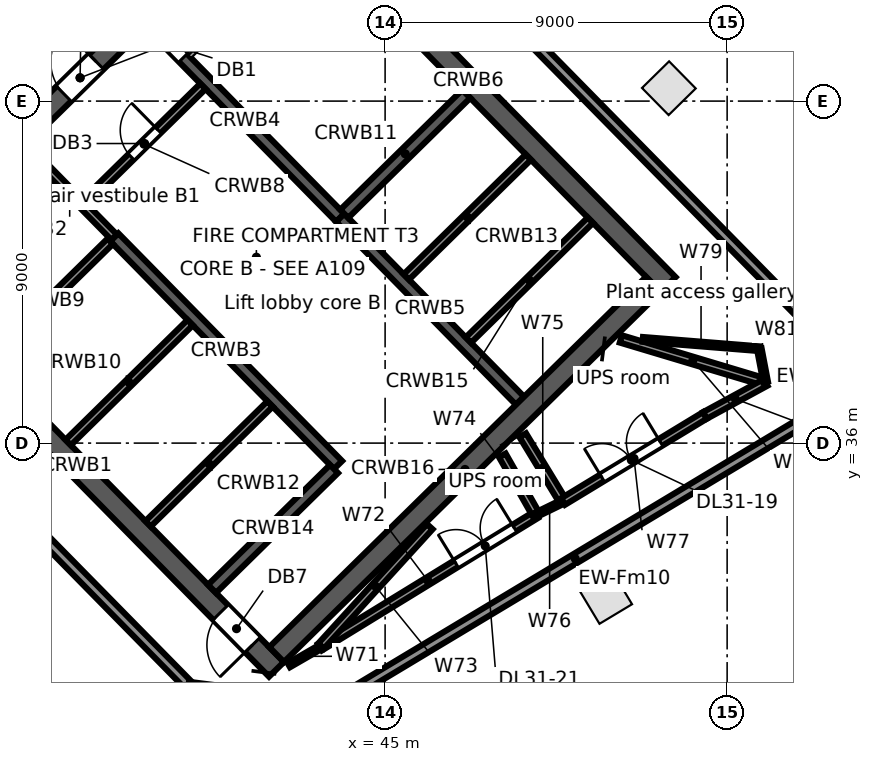
"""IFC4 building model, lengths in metres.
Left out: names, types, materials, properties, quantities, classifications, styles, units other than length and angle.
Written with IfcOpenShell. Run it as: python <this file> out.ifc"""

import sys

from ifc_helpers import new_model, si_unit, direction, frame, frame_2d, origin, origin_2d, place, context, subcontext, project, spatial, rectangle, extrude, element, fill, save


model = new_model("IFC4")
c1 = context("Model", 3, precision=1e-05, world=origin(), true_north=direction((0.0, 1.0)))
c2 = subcontext(c1, "Body", "Model", "MODEL_VIEW")
j1 = project(units=[si_unit("LENGTHUNIT", "METRE"), si_unit("PLANEANGLEUNIT", "RADIAN")], contexts=[c1])
p1 = place(None, origin())
s1 = spatial("IfcSite", under=j1, at=p1, CompositionType="ELEMENT")
p2 = place(p1, origin())
s2 = spatial("IfcBuilding", under=s1, at=p2, CompositionType="ELEMENT")
p3 = place(p2, frame((0.0, 0.0, 149.9)))
s3 = spatial("IfcBuildingStorey", under=s2, at=p3, CompositionType="ELEMENT", Elevation=149.9)
for number, where, z_axis, x_axis in (
    (1, (50.812, 31.931, 0.0), (0.0, 0.0, 1.0), (0.857, 0.515, 0.0)),
    (2, (52.467, 45.339, 0.0), (0.0, 0.0, 1.0), (-0.701, 0.713, 0.0)),
):
    element("IfcColumn", number, at=place(p3, frame(where, z_axis=z_axis, x_axis=x_axis)), inside=s3, PredefinedType="COLUMN", context=c2, shape_type="SweptSolid", body=[
        extrude(rectangle(XDim=1.0, YDim=1.0, at=origin_2d()), origin(), (0.0, 0.0, 1.0), 4.68),
    ])
p4 = place(p3, frame((39.897, 29.558, 0.0), z_axis=(0.0, 0.0, 1.0), x_axis=(-0.700908640523, 0.713251062137, 0.0)))
e3 = element("IfcWall", 3, at=p4, inside=s3, PredefinedType="STANDARD", context=c2, shape_type="SweptSolid", body=[
    extrude(rectangle(XDim=18.712, YDim=0.25, at=frame_2d((9.356, 0.0))), origin(), (0.0, 0.0, 1.0), 4.68),
])
p5 = place(p3, frame((43.643, 29.108, 0.0), z_axis=(0.0, 0.0, 1.0), x_axis=(-0.992006284618, 0.126188475223, 0.0)))
e4 = element("IfcWall", 4, at=p5, inside=s3, PredefinedType="STANDARD", context=c2, shape_type="SweptSolid", body=[
    extrude(rectangle(XDim=3.85, YDim=0.25, at=frame_2d((1.925, 0.0))), origin(), (0.0, 0.0, 1.0), 4.68),
])
p6 = place(p3, frame((56.441, 36.83, 0.0), z_axis=(0.0, 0.0, 1.0), x_axis=(-0.857162979594, -0.515045266374, 0.0)))
e5 = element("IfcWall", 5, at=p6, inside=s3, PredefinedType="STANDARD", context=c2, shape_type="SweptSolid", body=[
    extrude(rectangle(XDim=15.024, YDim=0.25, at=frame_2d((7.512, 0.0))), origin(), (0.0, 0.0, 1.0), 4.68),
])
p7 = place(p3, frame((39.04, 56.592, 0.0), z_axis=(0.0, 0.0, 1.0), x_axis=(0.700912545681, -0.713247224535, 0.0)))
e6 = element("IfcWall", 6, at=p7, inside=s3, PredefinedType="STANDARD", context=c2, shape_type="SweptSolid", body=[
    extrude(rectangle(XDim=25.157, YDim=0.25, at=frame_2d((12.579, 0.0))), origin(), (0.0, 0.0, 1.0), 4.68),
])
p8 = place(p3, frame((31.628, 40.745, 0.0), z_axis=(0.0, 0.0, 1.0), x_axis=(0.700911255944, -0.713248491965, 0.0)))
e7 = element("IfcWall", 7, at=p8, inside=s3, PredefinedType="SOLIDWALL", context=c2, shape_type="SweptSolid", body=[
    extrude(rectangle(XDim=15.0, YDim=0.55, at=frame_2d((7.5, 0.0))), origin(), (0.0, 0.0, 1.0), 4.68),
])
p9 = place(p8, frame((12.9, 0.0, 0.0)))
e8 = element("IfcOpeningElement", 8, at=p9, cuts=e7, PredefinedType="OPENING", context=c2, shape_type="SweptSolid", body=[
    extrude(rectangle(XDim=1.2, YDim=2.1, at=frame_2d((0.6, 1.05))), frame((0.0, 0.285, 0.0), z_axis=(0.0, -1.0, 0.0), x_axis=(1.0, 0.0, 0.0)), (0.0, 0.0, 1.0), 0.57),
])
p10 = place(p3, frame((35.526, 43.805, 0.0), z_axis=(0.0, 0.0, 1.0), x_axis=(0.700884863746, -0.713274426691, 0.0)))
e9 = element("IfcWall", 9, at=p10, inside=s3, PredefinedType="SOLIDWALL", context=c2, shape_type="SweptSolid", body=[
    extrude(rectangle(XDim=3.35, YDim=0.2, at=frame_2d((1.675, 0.0))), origin(), (0.0, 0.0, 1.0), 4.68),
])
p11 = place(p3, frame((37.874, 41.416, 0.0), z_axis=(0.0, 0.0, 1.0), x_axis=(0.700918271237, -0.71324159795, 0.0)))
e10 = element("IfcWall", 10, at=p11, inside=s3, PredefinedType="SOLIDWALL", context=c2, shape_type="SweptSolid", body=[
    extrude(rectangle(XDim=8.4, YDim=0.3, at=frame_2d((4.2, 0.0))), origin(), (0.0, 0.0, 1.0), 4.68),
])
p12 = place(p3, frame((38.807, 47.029, 0.0), z_axis=(0.0, 0.0, 1.0), x_axis=(0.700916852778, -0.713242991898, 0.0)))
e11 = element("IfcWall", 11, at=p12, inside=s3, PredefinedType="SOLIDWALL", context=c2, shape_type="SweptSolid", body=[
    extrude(rectangle(XDim=7.15, YDim=0.3, at=frame_2d((3.575, 0.0))), origin(), (0.0, 0.0, 1.0), 4.68),
])
p13 = place(p12, frame((0.25, 0.0, 0.0)))
e12 = element("IfcOpeningElement", 12, at=p13, cuts=e11, PredefinedType="OPENING", context=c2, shape_type="SweptSolid", body=[
    extrude(rectangle(XDim=1.0, YDim=2.1, at=frame_2d((0.5, 1.05))), frame((0.0, 0.16, 0.0), z_axis=(0.0, -1.0, 0.0), x_axis=(1.0, 0.0, 0.0)), (0.0, 0.0, 1.0), 0.32),
])
p14 = place(p3, frame((43.819, 41.929, 0.0), z_axis=(0.0, 0.0, 1.0), x_axis=(0.700931209592, -0.713228882912, 0.0)))
e13 = element("IfcWall", 13, at=p14, inside=s3, PredefinedType="SOLIDWALL", context=c2, shape_type="SweptSolid", body=[
    extrude(rectangle(XDim=6.75, YDim=0.3, at=frame_2d((3.375, 0.0))), origin(), (0.0, 0.0, 1.0), 4.68),
])
p15 = place(p3, frame((41.934, 50.873, 0.0), z_axis=(0.0, 0.0, 1.0), x_axis=(0.700911255944, -0.713248491965, 0.0)))
e14 = element("IfcWall", 14, at=p15, inside=s3, PredefinedType="SOLIDWALL", context=c2, shape_type="SweptSolid", body=[
    extrude(rectangle(XDim=15.0, YDim=0.55, at=frame_2d((7.5, 0.0))), origin(), (0.0, 0.0, 1.0), 4.68),
])
p16 = place(p3, frame((32.017, 40.742, 0.0), z_axis=(0.0, 0.0, 1.0), x_axis=(0.713253550094, 0.700906108746, 0.0)))
e15 = element("IfcWall", 15, at=p16, inside=s3, PredefinedType="SOLIDWALL", context=c2, shape_type="SweptSolid", body=[
    extrude(rectangle(XDim=13.9, YDim=0.55, at=frame_2d((6.95, 0.0))), origin(), (0.0, 0.0, 1.0), 4.68),
])
p17 = place(p16, frame((6.35, 0.0, 0.0)))
e16 = element("IfcOpeningElement", 16, at=p17, cuts=e15, PredefinedType="OPENING", context=c2, shape_type="SweptSolid", body=[
    extrude(rectangle(XDim=1.2, YDim=2.1, at=frame_2d((0.6, 1.05))), frame((0.0, 0.285, 0.0), z_axis=(0.0, -1.0, 0.0), x_axis=(1.0, 0.0, 0.0)), (0.0, 0.0, 1.0), 0.57),
])
p18 = place(p3, frame((37.104, 42.342, 0.0), z_axis=(0.0, 0.0, 1.0), x_axis=(0.713281298468, 0.700877870428, 0.0)))
e17 = element("IfcWall", 17, at=p18, inside=s3, PredefinedType="PARTITIONING", context=c2, shape_type="SweptSolid", body=[
    extrude(rectangle(XDim=4.35, YDim=0.2, at=frame_2d((2.175, 0.0))), origin(), (0.0, 0.0, 1.0), 4.68),
])
p19 = place(p18, frame((1.7, 0.0, 0.0)))
e18 = element("IfcOpeningElement", 18, at=p19, cuts=e17, PredefinedType="OPENING", context=c2, shape_type="SweptSolid", body=[
    extrude(rectangle(XDim=1.0, YDim=2.1, at=frame_2d((0.5, 1.05))), frame((0.0, 0.11, 0.0), z_axis=(0.0, -1.0, 0.0), x_axis=(1.0, 0.0, 0.0)), (0.0, 0.0, 1.0), 0.22),
])
p20 = place(p3, frame((34.558, 38.156, 0.0), z_axis=(0.0, 0.0, 1.0), x_axis=(0.713237924006, 0.700922009755, 0.0)))
e19 = element("IfcWall", 19, at=p20, inside=s3, PredefinedType="SOLIDWALL", context=c2, shape_type="SweptSolid", body=[
    extrude(rectangle(XDim=4.5, YDim=0.2, at=frame_2d((2.25, 0.0))), origin(), (0.0, 0.0, 1.0), 4.68),
])
p21 = place(p3, frame((36.66, 36.017, 0.0), z_axis=(0.0, 0.0, 1.0), x_axis=(0.713264577552, 0.700894886848, 0.0)))
e20 = element("IfcWall", 20, at=p21, inside=s3, PredefinedType="SOLIDWALL", context=c2, shape_type="SweptSolid", body=[
    extrude(rectangle(XDim=4.5, YDim=0.2, at=frame_2d((2.25, 0.0))), origin(), (0.0, 0.0, 1.0), 4.68),
])
p22 = place(p3, frame((43.926, 42.034, 0.0), z_axis=(0.0, 0.0, 1.0), x_axis=(0.713210801054, 0.700949608217, 0.0)))
e21 = element("IfcWall", 21, at=p22, inside=s3, PredefinedType="SOLIDWALL", context=c2, shape_type="SweptSolid", body=[
    extrude(rectangle(XDim=4.5, YDim=0.3, at=frame_2d((2.25, 0.0))), origin(), (0.0, 0.0, 1.0), 4.68),
])
p23 = place(p3, frame((38.763, 33.877, 0.0), z_axis=(0.0, 0.0, 1.0), x_axis=(0.713237455685, 0.700922486305, 0.0)))
e22 = element("IfcWall", 22, at=p23, inside=s3, PredefinedType="SOLIDWALL", context=c2, shape_type="SweptSolid", body=[
    extrude(rectangle(XDim=4.5, YDim=0.2, at=frame_2d((2.25, 0.0))), origin(), (0.0, 0.0, 1.0), 4.68),
])
p24 = place(p3, frame((45.559, 40.373, 0.0), z_axis=(0.0, 0.0, 1.0), x_axis=(0.713264577552, 0.700894886848, 0.0)))
e23 = element("IfcWall", 23, at=p24, inside=s3, PredefinedType="SOLIDWALL", context=c2, shape_type="SweptSolid", body=[
    extrude(rectangle(XDim=4.5, YDim=0.2, at=frame_2d((2.25, 0.0))), origin(), (0.0, 0.0, 1.0), 4.68),
])
p25 = place(p3, frame((40.445, 32.165, 0.0), z_axis=(0.0, 0.0, 1.0), x_axis=(0.713264577552, 0.700894886848, 0.0)))
e24 = element("IfcWall", 24, at=p25, inside=s3, PredefinedType="SOLIDWALL", context=c2, shape_type="SweptSolid", body=[
    extrude(rectangle(XDim=4.5, YDim=0.3, at=frame_2d((2.25, 0.0))), origin(), (0.0, 0.0, 1.0), 4.68),
])
p26 = place(p3, frame((47.192, 38.711, 0.0), z_axis=(0.0, 0.0, 1.0), x_axis=(0.713264577552, 0.700894886848, 0.0)))
e25 = element("IfcWall", 25, at=p26, inside=s3, PredefinedType="SOLIDWALL", context=c2, shape_type="SweptSolid", body=[
    extrude(rectangle(XDim=4.5, YDim=0.2, at=frame_2d((2.25, 0.0))), origin(), (0.0, 0.0, 1.0), 4.68),
])
p27 = place(p3, frame((42.145, 30.435, 0.0), z_axis=(0.0, 0.0, 1.0), x_axis=(0.713253550094, 0.700906108746, 0.0)))
e26 = element("IfcWall", 26, at=p27, inside=s3, PredefinedType="SOLIDWALL", context=c2, shape_type="SweptSolid", body=[
    extrude(rectangle(XDim=13.9, YDim=0.55, at=frame_2d((6.95, 0.0))), origin(), (0.0, 0.0, 1.0), 4.68),
])
p28 = place(p3, frame((42.466, 30.155, 0.0), z_axis=(0.0, 0.0, 1.0), x_axis=(0.865942754999, 0.50014312458, 0.0)))
e27 = element("IfcWall", 27, at=p28, inside=s3, PredefinedType="PARTITIONING", context=c2, shape_type="SweptSolid", body=[
    extrude(rectangle(XDim=0.938, YDim=0.125, at=frame_2d((0.469, 0.0))), origin(), (0.0, 0.0, 1.0), 4.68),
])
p29 = place(p3, frame((43.286, 30.629, 0.0), z_axis=(0.0, 0.0, 1.0), x_axis=(0.852618082173, 0.522534597852, 0.0)))
e28 = element("IfcWall", 28, at=p29, inside=s3, PredefinedType="PARTITIONING", context=c2, shape_type="SweptSolid", body=[
    extrude(rectangle(XDim=6.671, YDim=0.2, at=frame_2d((3.336, 0.0))), origin(), (0.0, 0.0, 1.0), 4.68),
])
p30 = place(p29, frame((4.2, 0.0, 0.0)))
e29 = element("IfcOpeningElement", 29, at=p30, cuts=e28, PredefinedType="OPENING", context=c2, shape_type="SweptSolid", body=[
    extrude(rectangle(XDim=1.8, YDim=2.1, at=frame_2d((0.9, 1.05))), frame((0.0, 0.11, 0.0), z_axis=(0.0, -1.0, 0.0), x_axis=(1.0, 0.0, 0.0)), (0.0, 0.0, 1.0), 0.22),
])
p31 = place(p3, frame((43.317, 30.663, 0.0), z_axis=(0.0, 0.0, 1.0), x_axis=(0.673505359067, 0.739182339689, 0.0)))
e30 = element("IfcWall", 30, at=p31, inside=s3, PredefinedType="PARTITIONING", context=c2, shape_type="SweptSolid", body=[
    extrude(rectangle(XDim=4.245, YDim=0.2, at=frame_2d((2.123, 0.0))), origin(), (0.0, 0.0, 1.0), 4.68),
])
p32 = place(p3, frame((48.085, 35.677, 0.0), z_axis=(0.0, 0.0, 1.0), x_axis=(0.494821324482, -0.868994739246, 0.0)))
e31 = element("IfcWall", 31, at=p32, inside=s3, PredefinedType="PARTITIONING", context=c2, shape_type="SweptSolid", body=[
    extrude(rectangle(XDim=1.777, YDim=0.2, at=frame_2d((0.888, 0.0))), origin(), (0.0, 0.0, 1.0), 4.68),
])
p33 = place(p3, frame((48.623, 36.206, 0.0), z_axis=(0.0, 0.0, 1.0), x_axis=(0.519728419687, -0.854331533873, 0.0)))
e32 = element("IfcWall", 32, at=p33, inside=s3, PredefinedType="PARTITIONING", context=c2, shape_type="SweptSolid", body=[
    extrude(rectangle(XDim=2.02, YDim=0.2, at=frame_2d((1.01, 0.0))), origin(), (0.0, 0.0, 1.0), 4.68),
])
p34 = place(p3, frame((48.983, 34.12, 0.0), z_axis=(0.0, 0.0, 1.0), x_axis=(0.898634361746, 0.43869839741, 0.0)))
e33 = element("IfcWall", 33, at=p34, inside=s3, PredefinedType="PARTITIONING", context=c2, shape_type="SweptSolid", body=[
    extrude(rectangle(XDim=0.77, YDim=0.125, at=frame_2d((0.385, 0.0))), origin(), (0.0, 0.0, 1.0), 4.411),
])
p35 = place(p3, frame((49.684, 34.463, 0.0), z_axis=(0.0, 0.0, 1.0), x_axis=(0.854856618014, 0.518864300794, 0.0)))
e34 = element("IfcWall", 34, at=p35, inside=s3, PredefinedType="PARTITIONING", context=c2, shape_type="SweptSolid", body=[
    extrude(rectangle(XDim=4.365, YDim=0.2, at=frame_2d((2.183, 0.0))), origin(), (0.0, 0.0, 1.0), 4.68),
])
p36 = place(p35, frame((1.2, 0.0, 0.0)))
e35 = element("IfcOpeningElement", 35, at=p36, cuts=e34, PredefinedType="OPENING", context=c2, shape_type="SweptSolid", body=[
    extrude(rectangle(XDim=1.8, YDim=2.1, at=frame_2d((0.9, 1.05))), frame((0.0, 0.11, 0.0), z_axis=(0.0, -1.0, 0.0), x_axis=(1.0, 0.0, 0.0)), (0.0, 0.0, 1.0), 0.22),
])
p37 = place(p3, frame((51.203, 38.741, 0.0), z_axis=(0.0, 0.0, 1.0), x_axis=(0.957877230713, -0.287178012533, 0.0)))
e36 = element("IfcWall", 36, at=p37, inside=s3, PredefinedType="PARTITIONING", context=c2, shape_type="SweptSolid", body=[
    extrude(rectangle(XDim=3.956, YDim=0.2, at=frame_2d((1.978, 0.0))), origin(), (0.0, 0.0, 1.0), 4.411),
])
p38 = place(p3, frame((51.781, 38.73, 0.0), z_axis=(0.0, 0.0, 1.0), x_axis=(0.996792009442, -0.080035554048, 0.0)))
e37 = element("IfcWall", 37, at=p38, inside=s3, PredefinedType="PARTITIONING", context=c2, shape_type="SweptSolid", body=[
    extrude(rectangle(XDim=3.075, YDim=0.125, at=frame_2d((1.537, 0.0))), origin(), (0.0, 0.0, 1.0), 4.68),
])
p39 = place(p3, frame((53.416, 36.728, 0.0), z_axis=(0.0, 0.0, 1.0), x_axis=(0.878412781822, 0.47790269379, 0.0)))
e38 = element("IfcWall", 38, at=p39, inside=s3, PredefinedType="PARTITIONING", context=c2, shape_type="SweptSolid", body=[
    extrude(rectangle(XDim=1.82, YDim=0.2, at=frame_2d((0.91, 0.0))), origin(), (0.0, 0.0, 1.0), 4.68),
])
p40 = place(p3, frame((54.846, 38.484, 0.0), z_axis=(0.0, 0.0, 1.0), x_axis=(0.187464730169, -0.982271334684, 0.0)))
e39 = element("IfcWall", 39, at=p40, inside=s3, PredefinedType="PARTITIONING", context=c2, shape_type="SweptSolid", body=[
    extrude(rectangle(XDim=0.891, YDim=0.125, at=frame_2d((0.445, 0.0))), origin(), (0.0, 0.0, 1.0), 4.411),
])
p41 = place(p13, origin())
e40 = element("IfcDoor", 40, at=p41, inside=s3, OperationType="SINGLE_SWING_LEFT", PredefinedType="DOOR", context=c2, shape_type="SweptSolid", body=[
    extrude(rectangle(XDim=1.0, YDim=2.1, at=frame_2d((0.5, 1.05))), frame((0.0, 0.025, 0.0), z_axis=(0.0, -1.0, 0.0), x_axis=(1.0, 0.0, 0.0)), (0.0, 0.0, 1.0), 0.05),
])
fill(e12, e40)
p42 = place(p19, origin())
e41 = element("IfcDoor", 41, at=p42, inside=s3, OperationType="SINGLE_SWING_RIGHT", PredefinedType="DOOR", context=c2, shape_type="SweptSolid", body=[
    extrude(rectangle(XDim=1.0, YDim=2.1, at=frame_2d((0.5, 1.05))), frame((0.0, 0.025, 0.0), z_axis=(0.0, -1.0, 0.0), x_axis=(1.0, 0.0, 0.0)), (0.0, 0.0, 1.0), 0.05),
])
fill(e18, e41)
p43 = place(p17, origin())
e42 = element("IfcDoor", 42, at=p43, inside=s3, OperationType="SINGLE_SWING_RIGHT", PredefinedType="DOOR", context=c2, shape_type="SweptSolid", body=[
    extrude(rectangle(XDim=1.2, YDim=2.1, at=frame_2d((0.6, 1.05))), frame((0.0, 0.025, 0.0), z_axis=(0.0, -1.0, 0.0), x_axis=(1.0, 0.0, 0.0)), (0.0, 0.0, 1.0), 0.05),
])
fill(e16, e42)
p44 = place(p9, frame((1.2, 0.0, 0.0), z_axis=(0.0, 0.0, 1.0), x_axis=(-1.0, 0.0, 0.0)))
e43 = element("IfcDoor", 43, at=p44, inside=s3, OperationType="SINGLE_SWING_LEFT", PredefinedType="DOOR", context=c2, shape_type="SweptSolid", body=[
    extrude(rectangle(XDim=1.2, YDim=2.1, at=frame_2d((0.6, 1.05))), frame((0.0, 0.025, 0.0), z_axis=(0.0, -1.0, 0.0), x_axis=(1.0, 0.0, 0.0)), (0.0, 0.0, 1.0), 0.05),
])
fill(e8, e43)
p45 = place(p36, origin())
e44 = element("IfcDoor", 44, at=p45, inside=s3, OperationType="DOUBLE_DOOR_SINGLE_SWING", PredefinedType="DOOR", context=c2, shape_type="SweptSolid", body=[
    extrude(rectangle(XDim=1.8, YDim=2.1, at=frame_2d((0.9, 1.05))), frame((0.0, 0.025, 0.0), z_axis=(0.0, -1.0, 0.0), x_axis=(1.0, 0.0, 0.0)), (0.0, 0.0, 1.0), 0.05),
])
fill(e35, e44)
p46 = place(p30, origin())
e45 = element("IfcDoor", 45, at=p46, inside=s3, OperationType="DOUBLE_DOOR_SINGLE_SWING", PredefinedType="DOOR", context=c2, shape_type="SweptSolid", body=[
    extrude(rectangle(XDim=1.8, YDim=2.1, at=frame_2d((0.9, 1.05))), frame((0.0, 0.025, 0.0), z_axis=(0.0, -1.0, 0.0), x_axis=(1.0, 0.0, 0.0)), (0.0, 0.0, 1.0), 0.05),
])
fill(e29, e45)
save(model, sys.argv[1])
